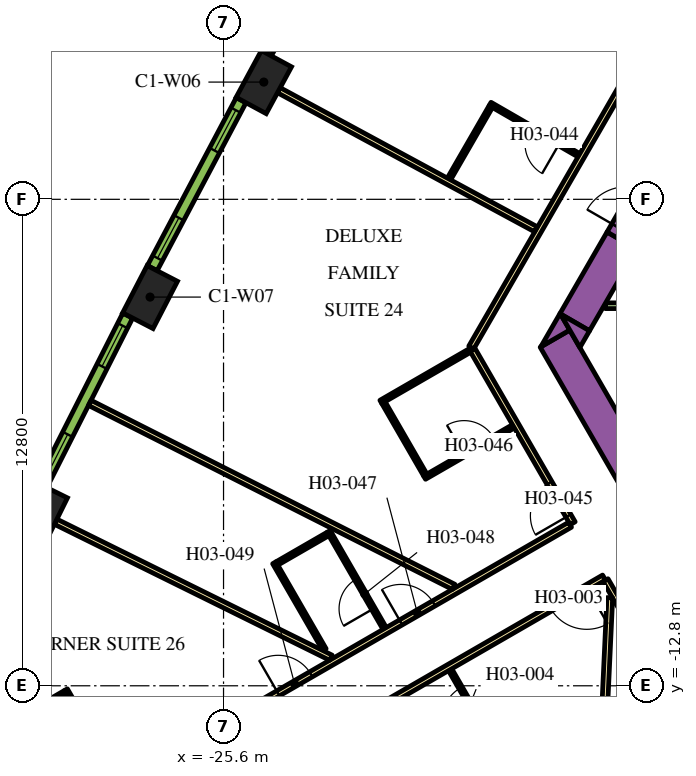
"""IFC4 building model, lengths in metres.
Left out: names, types, materials, properties, quantities, classifications, styles, units other than length and angle.
Written with IfcOpenShell. Run it as: python <this file> out.ifc"""

import sys

from ifc_helpers import new_model, si_unit, direction, frame, frame_2d, origin, origin_2d, place, context, subcontext, project, spatial, polyline, rectangle, outline, extrude, element, fill, save


model = new_model("IFC4")
c1 = context("Model", 3, precision=1e-05, world=origin(), true_north=direction((0.0, 1.0)))
c2 = subcontext(c1, "Body", "Model", "MODEL_VIEW")
j1 = project(units=[si_unit("LENGTHUNIT", "METRE"), si_unit("PLANEANGLEUNIT", "RADIAN")], contexts=[c1])
p1 = place(None, origin())
s1 = spatial("IfcSite", under=j1, at=p1, CompositionType="ELEMENT")
p2 = place(p1, origin())
s2 = spatial("IfcBuilding", under=s1, at=p2, CompositionType="ELEMENT")
p3 = place(p2, frame((0.0, 0.0, 58.8)))
s3 = spatial("IfcBuildingStorey", under=s2, at=p3, CompositionType="ELEMENT", Elevation=58.8)
for number, where, z_axis, x_axis in (
    (1, (-24.54, 3.085, 0.0), (0.0, 0.0, 1.0), (-0.476, -0.88, 0.0)),
    (2, (-27.533, -2.572, 0.0), (0.0, 0.0, 1.0), (-0.459, -0.888, 0.0)),
    (3, (-30.421, -8.284, 0.0), (0.0, 0.0, 1.0), (-0.443, -0.897, 0.0)),
):
    element("IfcColumn", number, at=place(p3, frame(where, z_axis=z_axis, x_axis=x_axis)), inside=s3, PredefinedType="COLUMN", context=c2, shape_type="SweptSolid", body=[
        extrude(rectangle(XDim=1.4, YDim=0.9, at=origin_2d()), origin(), (0.0, 0.0, 1.0), 3.9),
    ])
p4 = place(p3, frame((-12.134, -11.883, 0.0), z_axis=(0.0, 0.0, 1.0), x_axis=(-0.500005339912, 0.866022320763, 0.0)))
e4 = element("IfcWall", 4, at=p4, inside=s3, PredefinedType="SOLIDWALL", context=c2, shape_type="SweptSolid", body=[
    extrude(rectangle(XDim=9.488, YDim=0.9, at=frame_2d((4.744, 0.0))), origin(), (0.0, 0.0, 1.0), 3.9),
])
p5 = place(p3, origin())
e5 = element("IfcWall", 5, at=p5, inside=s3, PredefinedType="SOLIDWALL", context=c2, shape_type="SweptSolid", body=[
    extrude(outline(polyline([(-16.489, -3.44), (-17.251, -3.88), (-16.743, -3.0), (-16.489, -3.44)])), origin(), (0.0, 0.0, 1.0), 3.9),
])
p6 = place(p3, frame((-15.118, -1.085, 0.0), z_axis=(0.0, 0.0, 1.0), x_axis=(-0.50006606081, -0.865987260198, 0.0)))
e6 = element("IfcWall", 6, at=p6, inside=s3, PredefinedType="SOLIDWALL", context=c2, shape_type="SweptSolid", body=[
    extrude(rectangle(XDim=2.481, YDim=0.9, at=frame_2d((1.24, 0.0))), origin(), (0.0, 0.0, 1.0), 3.9),
])
e7 = element("IfcWall", 7, at=p5, inside=s3, PredefinedType="SOLIDWALL", context=c2, shape_type="SweptSolid", body=[
    extrude(outline(polyline([(-16.223, -3.9), (-16.732, -3.02), (-15.969, -3.46), (-16.223, -3.9)])), origin(), (0.0, 0.0, 1.0), 3.9),
])
p7 = place(p3, frame((-12.915, -2.8, 0.0), z_axis=(0.0, 0.0, 1.0), x_axis=(-1.0, 0.0, 0.0)))
e8 = element("IfcWall", 8, at=p7, inside=s3, PredefinedType="PARTITIONING", context=c2, shape_type="SweptSolid", body=[
    extrude(rectangle(XDim=2.637, YDim=0.15, at=frame_2d((1.318, 0.0))), origin(), (0.0, 0.0, 1.0), 2.75),
])
p8 = place(p3, frame((-15.118, -1.085, 0.0), z_axis=(0.0, 0.0, 1.0), x_axis=(0.500000056704, 0.866025371046, 0.0)))
e9 = element("IfcWall", 9, at=p8, inside=s3, PredefinedType="SOLIDWALL", context=c2, shape_type="SweptSolid", body=[
    extrude(rectangle(XDim=1.7, YDim=0.9, at=frame_2d((0.85, 0.0))), origin(), (0.0, 0.0, 1.0), 3.9),
])
p9 = place(p8, frame((0.25, 0.0, 0.0)))
e10 = element("IfcOpeningElement", 10, at=p9, cuts=e9, PredefinedType="OPENING", context=c2, shape_type="SweptSolid", body=[
    extrude(rectangle(XDim=1.2, YDim=2.1, at=frame_2d((0.6, 1.05))), frame((0.0, 0.46, 0.0), z_axis=(0.0, -1.0, 0.0), x_axis=(1.0, 0.0, 0.0)), (0.0, 0.0, 1.0), 0.92),
])
p10 = place(p3, frame((-19.081, -3.9, 0.0), z_axis=(0.0, 0.0, 1.0), x_axis=(0.499998313975, 0.866026377209, 0.0)))
e11 = element("IfcWall", 11, at=p10, inside=s3, PredefinedType="PARTITIONING", context=c2, shape_type="SweptSolid", body=[
    extrude(rectangle(XDim=25.766, YDim=0.15, at=frame_2d((12.883, 0.0))), origin(), (0.0, 0.0, 1.0), 2.75),
])
p11 = place(p10, frame((22.445, 0.0, 0.0)))
e12 = element("IfcOpeningElement", 12, at=p11, cuts=e11, PredefinedType="OPENING", context=c2, shape_type="SweptSolid", body=[
    extrude(rectangle(XDim=1.0, YDim=2.1, at=frame_2d((0.5, 1.05))), frame((0.0, 0.085, 0.0), z_axis=(0.0, -1.0, 0.0), x_axis=(1.0, 0.0, 0.0)), (0.0, 0.0, 1.0), 0.17),
])
p12 = place(p10, frame((21.138, 0.0, 0.0)))
e13 = element("IfcOpeningElement", 13, at=p12, cuts=e11, PredefinedType="OPENING", context=c2, shape_type="SweptSolid", body=[
    extrude(rectangle(XDim=1.0, YDim=2.1, at=frame_2d((0.5, 1.05))), frame((0.0, 0.085, 0.0), z_axis=(0.0, -1.0, 0.0), x_axis=(1.0, 0.0, 0.0)), (0.0, 0.0, 1.0), 0.17),
])
p13 = place(p10, frame((14.066, 0.0, 0.0)))
e14 = element("IfcOpeningElement", 14, at=p13, cuts=e11, PredefinedType="OPENING", context=c2, shape_type="SweptSolid", body=[
    extrude(rectangle(XDim=0.9, YDim=2.1, at=frame_2d((0.45, 1.05))), frame((0.0, 0.085, 0.0), z_axis=(0.0, -1.0, 0.0), x_axis=(1.0, 0.0, 0.0)), (0.0, 0.0, 1.0), 0.17),
])
p14 = place(p10, frame((11.693, 0.0, 0.0)))
e15 = element("IfcOpeningElement", 15, at=p14, cuts=e11, PredefinedType="OPENING", context=c2, shape_type="SweptSolid", body=[
    extrude(rectangle(XDim=1.0, YDim=2.1, at=frame_2d((0.5, 1.05))), frame((0.0, 0.085, 0.0), z_axis=(0.0, -1.0, 0.0), x_axis=(1.0, 0.0, 0.0)), (0.0, 0.0, 1.0), 0.17),
])
p15 = place(p3, frame((-16.412, -8.523, 0.0), z_axis=(0.0, 0.0, 1.0), x_axis=(-0.500001929737, 0.866024289647, 0.0)))
e16 = element("IfcWall", 16, at=p15, inside=s3, PredefinedType="PARTITIONING", context=c2, shape_type="SweptSolid", body=[
    extrude(rectangle(XDim=5.268, YDim=0.15, at=frame_2d((2.634, 0.0))), origin(), (0.0, 0.0, 1.0), 2.75),
])
p16 = place(p15, frame((0.226, 0.0, 0.0)))
e17 = element("IfcOpeningElement", 17, at=p16, cuts=e16, PredefinedType="OPENING", context=c2, shape_type="SweptSolid", body=[
    extrude(rectangle(XDim=1.0, YDim=2.1, at=frame_2d((0.5, 1.05))), frame((0.0, 0.085, 0.0), z_axis=(0.0, -1.0, 0.0), x_axis=(1.0, 0.0, 0.0)), (0.0, 0.0, 1.0), 0.17),
])
p17 = place(p3, frame((-30.463, -16.635, 0.0), z_axis=(0.0, 0.0, 1.0), x_axis=(0.866022394896, 0.500005211512, 0.0)))
e18 = element("IfcWall", 18, at=p17, inside=s3, PredefinedType="PARTITIONING", context=c2, shape_type="SweptSolid", body=[
    extrude(rectangle(XDim=16.144, YDim=0.15, at=frame_2d((8.072, 0.0))), origin(), (0.0, 0.0, 1.0), 2.75),
])
p18 = place(p17, frame((11.004, 0.0, 0.0)))
e19 = element("IfcOpeningElement", 19, at=p18, cuts=e18, PredefinedType="OPENING", context=c2, shape_type="SweptSolid", body=[
    extrude(rectangle(XDim=1.0, YDim=2.1, at=frame_2d((0.5, 1.05))), frame((0.0, 0.085, 0.0), z_axis=(0.0, -1.0, 0.0), x_axis=(1.0, 0.0, 0.0)), (0.0, 0.0, 1.0), 0.17),
])
p19 = place(p17, frame((7.274, 0.0, 0.0)))
e20 = element("IfcOpeningElement", 20, at=p19, cuts=e18, PredefinedType="OPENING", context=c2, shape_type="SweptSolid", body=[
    extrude(rectangle(XDim=1.0, YDim=2.1, at=frame_2d((0.5, 1.05))), frame((0.0, 0.085, 0.0), z_axis=(0.0, -1.0, 0.0), x_axis=(1.0, 0.0, 0.0)), (0.0, 0.0, 1.0), 0.17),
])
p20 = place(p3, frame((-15.587, -9.952, 0.0), z_axis=(0.0, 0.0, 1.0), x_axis=(-0.866022197818, -0.500005552856, 0.0)))
e21 = element("IfcWall", 21, at=p20, inside=s3, PredefinedType="PARTITIONING", context=c2, shape_type="SweptSolid", body=[
    extrude(rectangle(XDim=16.224, YDim=0.15, at=frame_2d((8.112, 0.0))), origin(), (0.0, 0.0, 1.0), 2.75),
])
p21 = place(p20, frame((7.949, 0.0, 0.0)))
e22 = element("IfcOpeningElement", 22, at=p21, cuts=e21, PredefinedType="OPENING", context=c2, shape_type="SweptSolid", body=[
    extrude(rectangle(XDim=1.0, YDim=2.1, at=frame_2d((0.5, 1.05))), frame((0.0, 0.085, 0.0), z_axis=(0.0, -1.0, 0.0), x_axis=(1.0, 0.0, 0.0)), (0.0, 0.0, 1.0), 0.17),
])
p22 = place(p20, frame((0.525, 0.0, 0.0)))
e23 = element("IfcOpeningElement", 23, at=p22, cuts=e21, PredefinedType="OPENING", context=c2, shape_type="SweptSolid", body=[
    extrude(rectangle(XDim=1.1, YDim=2.1, at=frame_2d((0.55, 1.05))), frame((0.0, 0.085, 0.0), z_axis=(0.0, -1.0, 0.0), x_axis=(1.0, 0.0, 0.0)), (0.0, 0.0, 1.0), 0.17),
])
p23 = place(p3, frame((-12.918, -14.575, 0.0), z_axis=(0.0, 0.0, 1.0), x_axis=(-0.500009150678, 0.866020120573, 0.0)))
e24 = element("IfcWall", 24, at=p23, inside=s3, PredefinedType="PARTITIONING", context=c2, shape_type="SweptSolid", body=[
    extrude(rectangle(XDim=5.258, YDim=0.15, at=frame_2d((2.629, 0.0))), origin(), (0.0, 0.0, 1.0), 2.75),
])
p24 = place(p3, frame((-30.018, -8.483, 0.0), z_axis=(0.0, 0.0, 1.0), x_axis=(0.896544505264, -0.44295366584, 0.0)))
e25 = element("IfcWall", 25, at=p24, inside=s3, PredefinedType="PARTITIONING", context=c2, shape_type="SweptSolid", body=[
    extrude(rectangle(XDim=8.079, YDim=0.15, at=frame_2d((4.04, 0.0))), origin(), (0.0, 0.0, 1.0), 2.75),
])
p25 = place(p3, frame((-29.12, -5.356, 0.0), z_axis=(0.0, 0.0, 1.0), x_axis=(0.892401965553, -0.451241323327, 0.0)))
e26 = element("IfcWall", 26, at=p25, inside=s3, PredefinedType="PARTITIONING", context=c2, shape_type="SweptSolid", body=[
    extrude(rectangle(XDim=10.729, YDim=0.15, at=frame_2d((5.364, 0.0))), origin(), (0.0, 0.0, 1.0), 2.75),
])
p26 = place(p3, frame((-24.145, 2.871, 0.0), z_axis=(0.0, 0.0, 1.0), x_axis=(0.879551725039, -0.475803281809, 0.0)))
e27 = element("IfcWall", 27, at=p26, inside=s3, PredefinedType="PARTITIONING", context=c2, shape_type="SweptSolid", body=[
    extrude(rectangle(XDim=7.688, YDim=0.15, at=frame_2d((3.844, 0.0))), origin(), (0.0, 0.0, 1.0), 2.75),
])
p27 = place(p3, frame((-15.973, -22.109, 0.0), z_axis=(0.0, 0.0, 1.0), x_axis=(0.046191717129, 0.998932592955, 0.0)))
e28 = element("IfcWall", 28, at=p27, inside=s3, PredefinedType="PARTITIONING", context=c2, shape_type="SweptSolid", body=[
    extrude(rectangle(XDim=11.638, YDim=0.15, at=frame_2d((5.819, 0.0))), origin(), (0.0, 0.0, 1.0), 2.75),
])
p28 = place(p3, frame((-18.237, -14.802, 0.0), z_axis=(0.0, 0.0, 1.0), x_axis=(-0.49994636267, 0.866056369097, 0.0)))
e29 = element("IfcWall", 29, at=p28, inside=s3, PredefinedType="PARTITIONING", context=c2, shape_type="SweptSolid", body=[
    extrude(rectangle(XDim=2.8, YDim=0.1, at=frame_2d((1.4, 0.0))), origin(), (0.0, 0.0, 1.0), 2.75),
])
p29 = place(p28, frame((1.25, 0.0, 0.0)))
e30 = element("IfcOpeningElement", 30, at=p29, cuts=e29, PredefinedType="OPENING", context=c2, shape_type="SweptSolid", body=[
    extrude(rectangle(XDim=1.0, YDim=2.1, at=frame_2d((0.5, 1.05))), frame((0.0, 0.06, 0.0), z_axis=(0.0, -1.0, 0.0), x_axis=(1.0, 0.0, 0.0)), (0.0, 0.0, 1.0), 0.12),
])
p30 = place(p3, frame((-16.247, 1.159, 0.0), z_axis=(0.0, 0.0, 1.0), x_axis=(-0.866059108428, 0.4999416173, 0.0)))
e31 = element("IfcWall", 31, at=p30, inside=s3, PredefinedType="PARTITIONING", context=c2, shape_type="SweptSolid", body=[
    extrude(rectangle(XDim=2.7, YDim=0.1, at=frame_2d((1.35, 0.0))), origin(), (0.0, 0.0, 1.0), 2.75),
])
p31 = place(p30, frame((0.6, 0.0, 0.0)))
e32 = element("IfcOpeningElement", 32, at=p31, cuts=e31, PredefinedType="OPENING", context=c2, shape_type="SweptSolid", body=[
    extrude(rectangle(XDim=0.9, YDim=2.1, at=frame_2d((0.45, 1.05))), frame((0.0, 0.06, 0.0), z_axis=(0.0, -1.0, 0.0), x_axis=(1.0, 0.0, 0.0)), (0.0, 0.0, 1.0), 0.12),
])
p32 = place(p3, frame((-18.567, 2.441, 0.0), z_axis=(0.0, 0.0, 1.0), x_axis=(-0.499946605688, -0.86605622881, 0.0)))
e33 = element("IfcWall", 33, at=p32, inside=s3, PredefinedType="PARTITIONING", context=c2, shape_type="SweptSolid", body=[
    extrude(rectangle(XDim=2.2, YDim=0.1, at=frame_2d((1.1, 0.0))), origin(), (0.0, 0.0, 1.0), 2.75),
])
p33 = place(p3, frame((-20.31, -7.323, 0.0), z_axis=(0.0, 0.0, 1.0), x_axis=(0.86599734893, 0.500048589285, 0.0)))
e34 = element("IfcWall", 34, at=p33, inside=s3, PredefinedType="PARTITIONING", context=c2, shape_type="SweptSolid", body=[
    extrude(rectangle(XDim=2.7, YDim=0.1, at=frame_2d((1.35, 0.0))), origin(), (0.0, 0.0, 1.0), 2.75),
])
p34 = place(p33, frame((1.2, 0.0, 0.0)))
e35 = element("IfcOpeningElement", 35, at=p34, cuts=e34, PredefinedType="OPENING", context=c2, shape_type="SweptSolid", body=[
    extrude(rectangle(XDim=0.9, YDim=2.1, at=frame_2d((0.45, 1.05))), frame((0.0, 0.06, 0.0), z_axis=(0.0, -1.0, 0.0), x_axis=(1.0, 0.0, 0.0)), (0.0, 0.0, 1.0), 0.12),
])
p35 = place(p3, frame((-20.291, -7.254, 0.0), z_axis=(0.0, 0.0, 1.0), x_axis=(-0.50002983664, 0.866008176907, 0.0)))
e36 = element("IfcWall", 36, at=p35, inside=s3, PredefinedType="PARTITIONING", context=c2, shape_type="SweptSolid", body=[
    extrude(rectangle(XDim=2.2, YDim=0.1, at=frame_2d((1.1, 0.0))), origin(), (0.0, 0.0, 1.0), 2.75),
])
p36 = place(p3, frame((-19.121, -3.981, 0.0), z_axis=(0.0, 0.0, 1.0), x_axis=(-0.866019956843, -0.50000943426, 0.0)))
e37 = element("IfcWall", 37, at=p36, inside=s3, PredefinedType="PARTITIONING", context=c2, shape_type="SweptSolid", body=[
    extrude(rectangle(XDim=2.7, YDim=0.1, at=frame_2d((1.35, 0.0))), origin(), (0.0, 0.0, 1.0), 2.75),
])
p37 = place(p3, frame((-21.36, -11.293, 0.0), z_axis=(0.0, 0.0, 1.0), x_axis=(-0.49997559174, 0.866039495442, 0.0)))
e38 = element("IfcWall", 38, at=p37, inside=s3, PredefinedType="PARTITIONING", context=c2, shape_type="SweptSolid", body=[
    extrude(rectangle(XDim=2.95, YDim=0.1, at=frame_2d((1.475, 0.0))), origin(), (0.0, 0.0, 1.0), 2.75),
])
p38 = place(p37, frame((0.6, 0.0, 0.0)))
e39 = element("IfcOpeningElement", 39, at=p38, cuts=e38, PredefinedType="OPENING", context=c2, shape_type="SweptSolid", body=[
    extrude(rectangle(XDim=0.9, YDim=2.1, at=frame_2d((0.45, 1.05))), frame((0.0, 0.06, 0.0), z_axis=(0.0, -1.0, 0.0), x_axis=(1.0, 0.0, 0.0)), (0.0, 0.0, 1.0), 0.12),
])
p39 = place(p3, frame((-22.853, -8.806, 0.0), z_axis=(0.0, 0.0, 1.0), x_axis=(-0.86601511528, -0.500017819788, 0.0)))
e40 = element("IfcWall", 40, at=p39, inside=s3, PredefinedType="PARTITIONING", context=c2, shape_type="SweptSolid", body=[
    extrude(rectangle(XDim=1.55, YDim=0.1, at=frame_2d((0.775, 0.0))), origin(), (0.0, 0.0, 1.0), 2.75),
])
p40 = place(p3, frame((-22.944, -11.85, 0.0), z_axis=(0.0, 0.0, 1.0), x_axis=(-0.499938597367, 0.866060851709, 0.0)))
e41 = element("IfcWall", 41, at=p40, inside=s3, PredefinedType="PARTITIONING", context=c2, shape_type="SweptSolid", body=[
    extrude(rectangle(XDim=2.64, YDim=0.1, at=frame_2d((1.32, 0.0))), origin(), (0.0, 0.0, 1.0), 2.75),
])
p41 = place(p3, frame((-28.352, -15.33, 0.0), z_axis=(0.0, 0.0, 1.0), x_axis=(-0.500049511043, 0.865996816683, 0.0)))
e42 = element("IfcWall", 42, at=p41, inside=s3, PredefinedType="PARTITIONING", context=c2, shape_type="SweptSolid", body=[
    extrude(rectangle(XDim=2.8, YDim=0.1, at=frame_2d((1.4, 0.0))), origin(), (0.0, 0.0, 1.0), 2.75),
])
p42 = place(p41, frame((0.6, 0.0, 0.0)))
e43 = element("IfcOpeningElement", 43, at=p42, cuts=e42, PredefinedType="OPENING", context=c2, shape_type="SweptSolid", body=[
    extrude(rectangle(XDim=0.9, YDim=2.1, at=frame_2d((0.45, 1.05))), frame((0.0, 0.06, 0.0), z_axis=(0.0, -1.0, 0.0), x_axis=(1.0, 0.0, 0.0)), (0.0, 0.0, 1.0), 0.12),
])
p43 = place(p3, frame((-29.771, -12.973, 0.0), z_axis=(0.0, 0.0, 1.0), x_axis=(-0.865980596518, -0.500077600433, 0.0)))
e44 = element("IfcWall", 44, at=p43, inside=s3, PredefinedType="PARTITIONING", context=c2, shape_type="SweptSolid", body=[
    extrude(rectangle(XDim=2.4, YDim=0.1, at=frame_2d((1.2, 0.0))), origin(), (0.0, 0.0, 1.0), 2.75),
])
p44 = place(p3, frame((-22.05, 8.22, 0.0), z_axis=(0.0, 0.0, 1.0), x_axis=(-0.483912572871, -0.875116347589, 0.0)))
e45 = element("IfcWall", 45, at=p44, inside=s3, PredefinedType="SOLIDWALL", context=c2, shape_type="SweptSolid", body=[
    extrude(rectangle(XDim=4.998, YDim=0.29, at=frame_2d((2.499, 0.0))), origin(), (0.0, 0.0, 1.0), 3.65),
])
p45 = place(p44, frame((0.297, 0.0, 0.9)))
e46 = element("IfcOpeningElement", 46, at=p45, cuts=e45, PredefinedType="OPENING", context=c2, shape_type="SweptSolid", body=[
    extrude(rectangle(XDim=1.2, YDim=2.15, at=frame_2d((0.6, 1.075))), frame((0.0, 0.155, 0.0), z_axis=(0.0, -1.0, 0.0), x_axis=(1.0, 0.0, 0.0)), (0.0, 0.0, 1.0), 0.31),
])
p46 = place(p44, frame((3.501, 0.0, 0.9)))
e47 = element("IfcOpeningElement", 47, at=p46, cuts=e45, PredefinedType="OPENING", context=c2, shape_type="SweptSolid", body=[
    extrude(rectangle(XDim=1.2, YDim=2.15, at=frame_2d((0.6, 1.075))), frame((0.0, 0.155, 0.0), z_axis=(0.0, -1.0, 0.0), x_axis=(1.0, 0.0, 0.0)), (0.0, 0.0, 1.0), 0.31),
])
p47 = place(p3, frame((-25.138, 2.608, 0.0), z_axis=(0.0, 0.0, 1.0), x_axis=(-0.467629620899, -0.883924509026, 0.0)))
e48 = element("IfcWall", 48, at=p47, inside=s3, PredefinedType="SOLIDWALL", context=c2, shape_type="SweptSolid", body=[
    extrude(rectangle(XDim=4.998, YDim=0.29, at=frame_2d((2.499, 0.0))), origin(), (0.0, 0.0, 1.0), 3.65),
])
p48 = place(p47, frame((0.297, 0.0, 0.9)))
e49 = element("IfcOpeningElement", 49, at=p48, cuts=e48, PredefinedType="OPENING", context=c2, shape_type="SweptSolid", body=[
    extrude(rectangle(XDim=1.2, YDim=2.15, at=frame_2d((0.6, 1.075))), frame((0.0, 0.155, 0.0), z_axis=(0.0, -1.0, 0.0), x_axis=(1.0, 0.0, 0.0)), (0.0, 0.0, 1.0), 0.31),
])
p49 = place(p47, frame((3.501, 0.0, 0.9)))
e50 = element("IfcOpeningElement", 50, at=p49, cuts=e48, PredefinedType="OPENING", context=c2, shape_type="SweptSolid", body=[
    extrude(rectangle(XDim=1.2, YDim=2.15, at=frame_2d((0.6, 1.075))), frame((0.0, 0.155, 0.0), z_axis=(0.0, -1.0, 0.0), x_axis=(1.0, 0.0, 0.0)), (0.0, 0.0, 1.0), 0.31),
])
p50 = place(p3, frame((-28.122, -3.06, 0.0), z_axis=(0.0, 0.0, 1.0), x_axis=(-0.451233929645, -0.892405704115, 0.0)))
e51 = element("IfcWall", 51, at=p50, inside=s3, PredefinedType="SOLIDWALL", context=c2, shape_type="SweptSolid", body=[
    extrude(rectangle(XDim=4.998, YDim=0.29, at=frame_2d((2.499, 0.0))), origin(), (0.0, 0.0, 1.0), 3.65),
])
p51 = place(p50, frame((0.297, 0.0, 0.9)))
e52 = element("IfcOpeningElement", 52, at=p51, cuts=e51, PredefinedType="OPENING", context=c2, shape_type="SweptSolid", body=[
    extrude(rectangle(XDim=1.2, YDim=2.15, at=frame_2d((0.6, 1.075))), frame((0.0, 0.155, 0.0), z_axis=(0.0, -1.0, 0.0), x_axis=(1.0, 0.0, 0.0)), (0.0, 0.0, 1.0), 0.31),
])
p52 = place(p50, frame((3.501, 0.0, 0.9)))
e53 = element("IfcOpeningElement", 53, at=p52, cuts=e51, PredefinedType="OPENING", context=c2, shape_type="SweptSolid", body=[
    extrude(rectangle(XDim=1.2, YDim=2.15, at=frame_2d((0.6, 1.075))), frame((0.0, 0.155, 0.0), z_axis=(0.0, -1.0, 0.0), x_axis=(1.0, 0.0, 0.0)), (0.0, 0.0, 1.0), 0.31),
])
p53 = place(p22, origin())
e54 = element("IfcDoor", 54, at=p53, inside=s3, OperationType="SINGLE_SWING_LEFT", PredefinedType="DOOR", context=c2, shape_type="SweptSolid", body=[
    extrude(rectangle(XDim=1.1, YDim=2.1, at=frame_2d((0.55, 1.05))), frame((0.0, 0.025, 0.0), z_axis=(0.0, -1.0, 0.0), x_axis=(1.0, 0.0, 0.0)), (0.0, 0.0, 1.0), 0.05),
])
fill(e23, e54)
p54 = place(p29, origin())
e55 = element("IfcDoor", 55, at=p54, inside=s3, OperationType="SINGLE_SWING_LEFT", PredefinedType="DOOR", context=c2, shape_type="SweptSolid", body=[
    extrude(rectangle(XDim=1.0, YDim=2.1, at=frame_2d((0.5, 1.05))), frame((0.0, 0.025, 0.0), z_axis=(0.0, -1.0, 0.0), x_axis=(1.0, 0.0, 0.0)), (0.0, 0.0, 1.0), 0.05),
])
fill(e30, e55)
p55 = place(p31, origin())
e56 = element("IfcDoor", 56, at=p55, inside=s3, OperationType="SINGLE_SWING_LEFT", PredefinedType="DOOR", context=c2, shape_type="SweptSolid", body=[
    extrude(rectangle(XDim=0.9, YDim=2.1, at=frame_2d((0.45, 1.05))), frame((0.0, 0.025, 0.0), z_axis=(0.0, -1.0, 0.0), x_axis=(1.0, 0.0, 0.0)), (0.0, 0.0, 1.0), 0.05),
])
fill(e32, e56)
p56 = place(p16, origin())
e57 = element("IfcDoor", 57, at=p56, inside=s3, OperationType="SINGLE_SWING_LEFT", PredefinedType="DOOR", context=c2, shape_type="SweptSolid", body=[
    extrude(rectangle(XDim=1.0, YDim=2.1, at=frame_2d((0.5, 1.05))), frame((0.0, 0.025, 0.0), z_axis=(0.0, -1.0, 0.0), x_axis=(1.0, 0.0, 0.0)), (0.0, 0.0, 1.0), 0.05),
])
fill(e17, e57)
p57 = place(p34, origin())
e58 = element("IfcDoor", 58, at=p57, inside=s3, OperationType="SINGLE_SWING_RIGHT", PredefinedType="DOOR", context=c2, shape_type="SweptSolid", body=[
    extrude(rectangle(XDim=0.9, YDim=2.1, at=frame_2d((0.45, 1.05))), frame((0.0, 0.025, 0.0), z_axis=(0.0, -1.0, 0.0), x_axis=(1.0, 0.0, 0.0)), (0.0, 0.0, 1.0), 0.05),
])
fill(e35, e58)
p58 = place(p18, origin())
e59 = element("IfcDoor", 59, at=p58, inside=s3, OperationType="SINGLE_SWING_RIGHT", PredefinedType="DOOR", context=c2, shape_type="SweptSolid", body=[
    extrude(rectangle(XDim=1.0, YDim=2.1, at=frame_2d((0.5, 1.05))), frame((0.0, 0.025, 0.0), z_axis=(0.0, -1.0, 0.0), x_axis=(1.0, 0.0, 0.0)), (0.0, 0.0, 1.0), 0.05),
])
fill(e19, e59)
p59 = place(p38, origin())
e60 = element("IfcDoor", 60, at=p59, inside=s3, OperationType="SINGLE_SWING_LEFT", PredefinedType="DOOR", context=c2, shape_type="SweptSolid", body=[
    extrude(rectangle(XDim=0.9, YDim=2.1, at=frame_2d((0.45, 1.05))), frame((0.0, 0.025, 0.0), z_axis=(0.0, -1.0, 0.0), x_axis=(1.0, 0.0, 0.0)), (0.0, 0.0, 1.0), 0.05),
])
fill(e39, e60)
p60 = place(p19, origin())
e61 = element("IfcDoor", 61, at=p60, inside=s3, OperationType="SINGLE_SWING_RIGHT", PredefinedType="DOOR", context=c2, shape_type="SweptSolid", body=[
    extrude(rectangle(XDim=1.0, YDim=2.1, at=frame_2d((0.5, 1.05))), frame((0.0, 0.025, 0.0), z_axis=(0.0, -1.0, 0.0), x_axis=(1.0, 0.0, 0.0)), (0.0, 0.0, 1.0), 0.05),
])
fill(e20, e61)
p61 = place(p48, origin())
e62 = element("IfcWindow", 62, at=p61, inside=s3, PartitioningType="DOUBLE_PANEL_VERTICAL", PredefinedType="WINDOW", context=c2, shape_type="SweptSolid", body=[
    extrude(rectangle(XDim=1.2, YDim=2.15, at=frame_2d((0.6, 1.075))), frame((0.0, 0.015, 0.0), z_axis=(0.0, -1.0, 0.0), x_axis=(1.0, 0.0, 0.0)), (0.0, 0.0, 1.0), 0.06),
])
fill(e49, e62)
p62 = place(p49, origin())
e63 = element("IfcWindow", 63, at=p62, inside=s3, PartitioningType="DOUBLE_PANEL_VERTICAL", PredefinedType="WINDOW", context=c2, shape_type="SweptSolid", body=[
    extrude(rectangle(XDim=1.2, YDim=2.15, at=frame_2d((0.6, 1.075))), frame((0.0, 0.015, 0.0), z_axis=(0.0, -1.0, 0.0), x_axis=(1.0, 0.0, 0.0)), (0.0, 0.0, 1.0), 0.06),
])
fill(e50, e63)
p63 = place(p51, origin())
e64 = element("IfcWindow", 64, at=p63, inside=s3, PartitioningType="DOUBLE_PANEL_VERTICAL", PredefinedType="WINDOW", context=c2, shape_type="SweptSolid", body=[
    extrude(rectangle(XDim=1.2, YDim=2.15, at=frame_2d((0.6, 1.075))), frame((0.0, 0.015, 0.0), z_axis=(0.0, -1.0, 0.0), x_axis=(1.0, 0.0, 0.0)), (0.0, 0.0, 1.0), 0.06),
])
fill(e52, e64)
p64 = place(p52, origin())
e65 = element("IfcWindow", 65, at=p64, inside=s3, PartitioningType="DOUBLE_PANEL_VERTICAL", PredefinedType="WINDOW", context=c2, shape_type="SweptSolid", body=[
    extrude(rectangle(XDim=1.2, YDim=2.15, at=frame_2d((0.6, 1.075))), frame((0.0, 0.015, 0.0), z_axis=(0.0, -1.0, 0.0), x_axis=(1.0, 0.0, 0.0)), (0.0, 0.0, 1.0), 0.06),
])
fill(e53, e65)
save(model, sys.argv[1])
